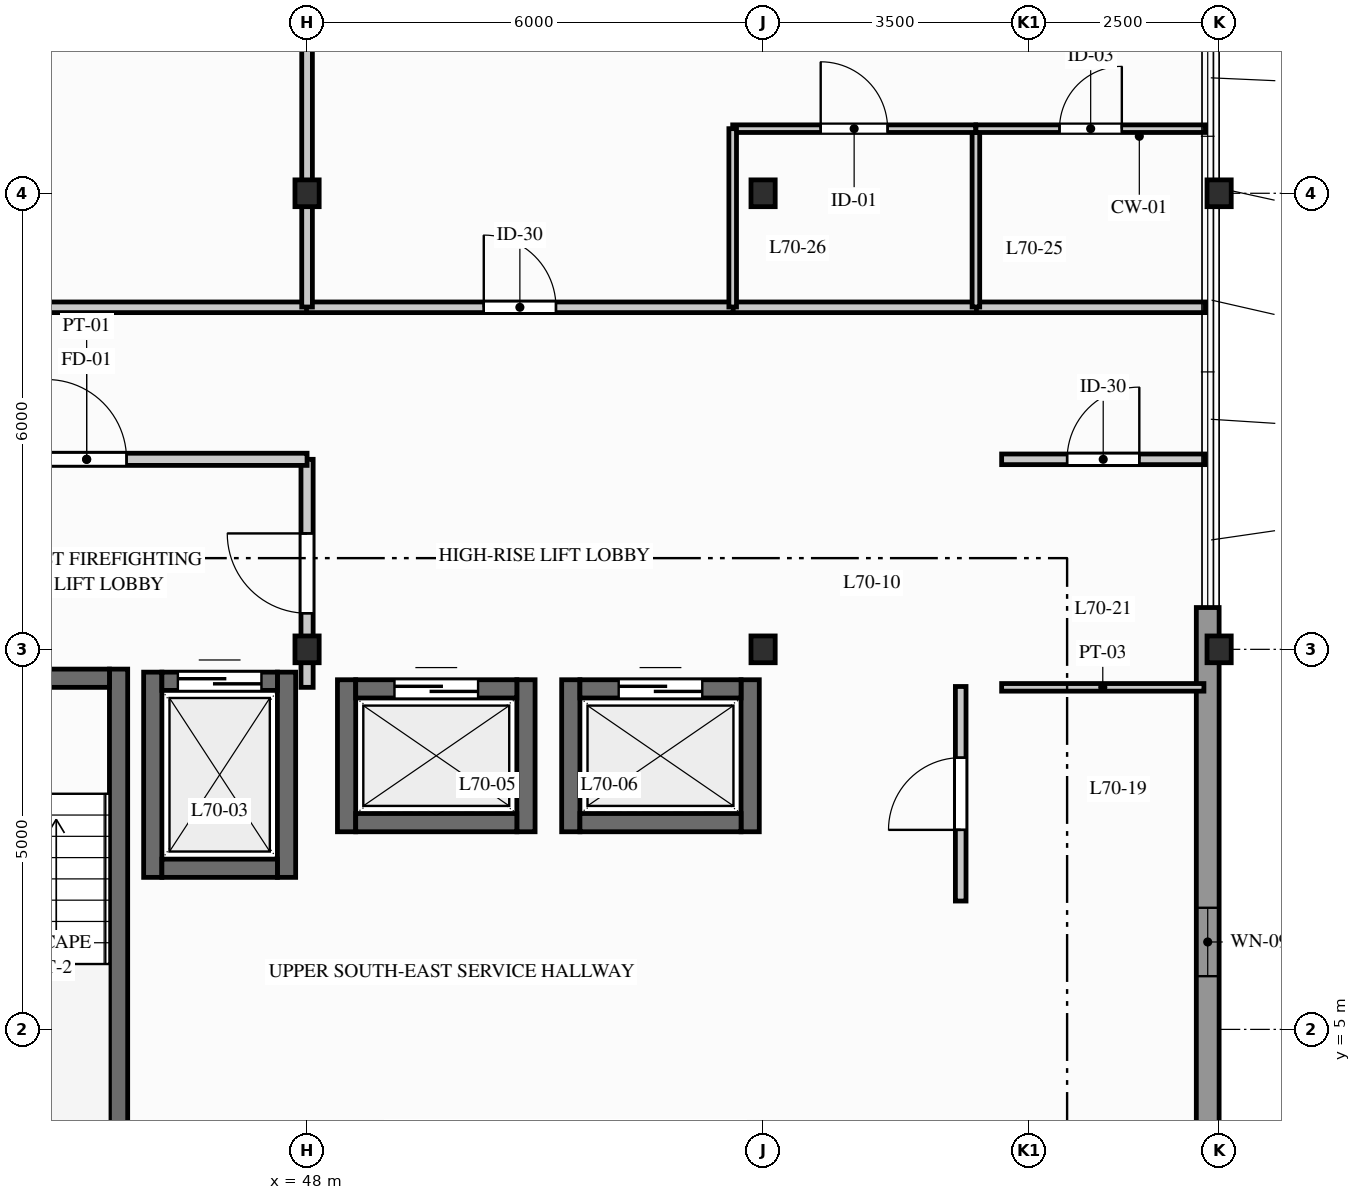
"""IFC4 building model, lengths in metres.
Left out: names, types, materials, properties, quantities, classifications, styles, units other than length and angle.
Written with IfcOpenShell. Run it as: python <this file> out.ifc"""

import sys

from ifc_helpers import new_model, si_unit, direction, frame, frame_2d, origin, origin_2d, place, context, subcontext, project, spatial, rectangle, i_section, extrude, element, fill, save


model = new_model("IFC4")
c1 = context("Model", 3, precision=1e-05, world=origin(), true_north=direction((0.0, 1.0)))
c2 = subcontext(c1, "Body", "Model", "MODEL_VIEW")
j1 = project(units=[si_unit("LENGTHUNIT", "METRE"), si_unit("PLANEANGLEUNIT", "RADIAN")], contexts=[c1])
p1 = place(None, origin())
s1 = spatial("IfcSite", under=j1, at=p1, CompositionType="ELEMENT")
p2 = place(p1, origin())
s2 = spatial("IfcBuilding", under=s1, at=p2, CompositionType="ELEMENT")
p3 = place(p2, frame((0.0, 0.0, 230.4)))
s3 = spatial("IfcBuildingStorey", under=s2, at=p3, CompositionType="ELEMENT", Elevation=230.4)
for number, where, z_axis, x_axis in (
    (1, (48.0, 10.0, 0.0), (0.0, 0.0, 1.0), (1.0, 0.0, 0.0)),
    (2, (48.0, 16.0, 0.0), (0.0, 0.0, 1.0), (1.0, 0.0, 0.0)),
    (3, (54.0, 10.0, 0.0), (0.0, 0.0, 1.0), (1.0, 0.0, 0.0)),
    (4, (54.0, 16.0, 0.0), (0.0, 0.0, 1.0), (1.0, 0.0, 0.0)),
    (5, (60.0, 10.0, 0.0), (0.0, 0.0, 1.0), (1.0, 0.0, 0.0)),
    (6, (60.0, 16.0, 0.0), (0.0, 0.0, 1.0), (1.0, 0.0, 0.0)),
):
    element("IfcColumn", number, at=place(p3, frame(where, z_axis=z_axis, x_axis=x_axis)), inside=s3, PredefinedType="COLUMN", context=c2, shape_type="SweptSolid", body=[
        extrude(i_section(OverallWidth=0.318, OverallDepth=0.353, WebThickness=0.023, FlangeThickness=0.038, FilletRadius=0.015, at=origin_2d()), origin(), (0.0, 0.0, 1.0), 3.1),
    ])
p4 = place(p3, frame((59.85, 2.5, 0.0), z_axis=(0.0, 0.0, 1.0), x_axis=(0.0, 1.0, 0.0)))
e7 = element("IfcWall", 7, at=p4, inside=s3, PredefinedType="STANDARD", context=c2, shape_type="SweptSolid", body=[
    extrude(rectangle(XDim=8.05, YDim=0.3, at=frame_2d((4.025, 0.0))), origin(), (0.0, 0.0, 1.0), 2.89),
])
p5 = place(p4, frame((3.2, 0.0, 1.2)))
e8 = element("IfcOpeningElement", 8, at=p5, cuts=e7, PredefinedType="OPENING", context=c2, shape_type="SweptSolid", body=[
    extrude(rectangle(XDim=0.9, YDim=0.9, at=frame_2d((0.45, 0.45))), frame((0.0, 0.16, 0.0), z_axis=(0.0, -1.0, 0.0), x_axis=(1.0, 0.0, 0.0)), (0.0, 0.0, 1.0), 0.32),
])
p6 = place(p3, frame((45.52, 2.54, 0.0), z_axis=(0.0, 0.0, 1.0), x_axis=(0.0, 1.0, 0.0)))
e9 = element("IfcWall", 9, at=p6, inside=s3, PredefinedType="SHEAR", context=c2, shape_type="SweptSolid", body=[
    extrude(rectangle(XDim=7.2, YDim=0.24, at=frame_2d((3.6, 0.0))), origin(), (0.0, 0.0, 1.0), 2.89),
])
p7 = place(p3, frame((45.4, 9.62, 0.0), z_axis=(0.0, 0.0, 1.0), x_axis=(-1.0, 0.0, 0.0)))
e10 = element("IfcWall", 10, at=p7, inside=s3, PredefinedType="SHEAR", context=c2, shape_type="SweptSolid", body=[
    extrude(rectangle(XDim=2.95, YDim=0.24, at=frame_2d((1.475, 0.0))), origin(), (0.0, 0.0, 1.0), 2.89),
])
p8 = place(p7, frame((0.95, 0.0, 0.0)))
e11 = element("IfcOpeningElement", 11, at=p8, cuts=e10, PredefinedType="OPENING", context=c2, shape_type="SweptSolid", body=[
    extrude(rectangle(XDim=1.05, YDim=2.06, at=frame_2d((0.525, 1.03))), frame((0.0, 0.13, 0.0), z_axis=(0.0, -1.0, 0.0), x_axis=(1.0, 0.0, 0.0)), (0.0, 0.0, 1.0), 0.26),
])
for number, where, z_axis, x_axis in (
    (12, (45.97, 7.0, 0.0), (0.0, 0.0, 1.0), (0.0, 1.0, 0.0)),
    (13, (47.73, 7.0, 0.0), (0.0, 0.0, 1.0), (0.0, 1.0, 0.0)),
):
    element("IfcWall", number, at=place(p3, frame(where, z_axis=z_axis, x_axis=x_axis)), inside=s3, PredefinedType="SHEAR", context=c2, shape_type="SweptSolid", body=[
        extrude(rectangle(XDim=2.7, YDim=0.24, at=frame_2d((1.35, 0.0))), origin(), (0.0, 0.0, 1.0), 2.89),
    ])
p9 = place(p3, frame((46.09, 7.12, 0.0), z_axis=(0.0, 0.0, 1.0), x_axis=(1.0, 0.0, 0.0)))
e14 = element("IfcWall", 14, at=p9, inside=s3, PredefinedType="SHEAR", context=c2, shape_type="SweptSolid", body=[
    extrude(rectangle(XDim=1.52, YDim=0.24, at=frame_2d((0.76, 0.0))), origin(), (0.0, 0.0, 1.0), 2.89),
])
p10 = place(p3, frame((46.09, 9.58, 0.0), z_axis=(0.0, 0.0, 1.0), x_axis=(1.0, 0.0, 0.0)))
e15 = element("IfcWall", 15, at=p10, inside=s3, PredefinedType="SHEAR", context=c2, shape_type="SweptSolid", body=[
    extrude(rectangle(XDim=1.52, YDim=0.24, at=frame_2d((0.76, 0.0))), origin(), (0.0, 0.0, 1.0), 2.89),
])
p11 = place(p10, frame((0.21, 0.0, 0.0)))
e16 = element("IfcOpeningElement", 16, at=p11, cuts=e15, PredefinedType="OPENING", context=c2, shape_type="SweptSolid", body=[
    extrude(rectangle(XDim=1.1, YDim=2.06, at=frame_2d((0.55, 1.03))), frame((0.0, 0.13, 0.0), z_axis=(0.0, -1.0, 0.0), x_axis=(1.0, 0.0, 0.0)), (0.0, 0.0, 1.0), 0.26),
])
for number, where, z_axis, x_axis in (
    (17, (48.52, 7.6, 0.0), (0.0, 0.0, 1.0), (0.0, 1.0, 0.0)),
    (18, (50.88, 7.6, 0.0), (0.0, 0.0, 1.0), (0.0, 1.0, 0.0)),
):
    element("IfcWall", number, at=place(p3, frame(where, z_axis=z_axis, x_axis=x_axis)), inside=s3, PredefinedType="SHEAR", context=c2, shape_type="SweptSolid", body=[
        extrude(rectangle(XDim=2.0, YDim=0.24, at=frame_2d((1.0, 0.0))), origin(), (0.0, 0.0, 1.0), 2.89),
    ])
p12 = place(p3, frame((48.64, 7.72, 0.0), z_axis=(0.0, 0.0, 1.0), x_axis=(1.0, 0.0, 0.0)))
e19 = element("IfcWall", 19, at=p12, inside=s3, PredefinedType="SHEAR", context=c2, shape_type="SweptSolid", body=[
    extrude(rectangle(XDim=2.12, YDim=0.24, at=frame_2d((1.06, 0.0))), origin(), (0.0, 0.0, 1.0), 2.89),
])
p13 = place(p3, frame((48.64, 9.48, 0.0), z_axis=(0.0, 0.0, 1.0), x_axis=(1.0, 0.0, 0.0)))
e20 = element("IfcWall", 20, at=p13, inside=s3, PredefinedType="SHEAR", context=c2, shape_type="SweptSolid", body=[
    extrude(rectangle(XDim=2.12, YDim=0.24, at=frame_2d((1.06, 0.0))), origin(), (0.0, 0.0, 1.0), 2.89),
])
p14 = place(p13, frame((0.51, 0.0, 0.0)))
e21 = element("IfcOpeningElement", 21, at=p14, cuts=e20, PredefinedType="OPENING", context=c2, shape_type="SweptSolid", body=[
    extrude(rectangle(XDim=1.1, YDim=2.06, at=frame_2d((0.55, 1.03))), frame((0.0, 0.13, 0.0), z_axis=(0.0, -1.0, 0.0), x_axis=(1.0, 0.0, 0.0)), (0.0, 0.0, 1.0), 0.26),
])
for number, where, z_axis, x_axis in (
    (22, (51.47, 7.6, 0.0), (0.0, 0.0, 1.0), (0.0, 1.0, 0.0)),
    (23, (53.83, 7.6, 0.0), (0.0, 0.0, 1.0), (0.0, 1.0, 0.0)),
):
    element("IfcWall", number, at=place(p3, frame(where, z_axis=z_axis, x_axis=x_axis)), inside=s3, PredefinedType="SHEAR", context=c2, shape_type="SweptSolid", body=[
        extrude(rectangle(XDim=2.0, YDim=0.24, at=frame_2d((1.0, 0.0))), origin(), (0.0, 0.0, 1.0), 2.89),
    ])
p15 = place(p3, frame((51.59, 7.72, 0.0), z_axis=(0.0, 0.0, 1.0), x_axis=(1.0, 0.0, 0.0)))
e24 = element("IfcWall", 24, at=p15, inside=s3, PredefinedType="SHEAR", context=c2, shape_type="SweptSolid", body=[
    extrude(rectangle(XDim=2.12, YDim=0.24, at=frame_2d((1.06, 0.0))), origin(), (0.0, 0.0, 1.0), 2.89),
])
p16 = place(p3, frame((51.59, 9.48, 0.0), z_axis=(0.0, 0.0, 1.0), x_axis=(1.0, 0.0, 0.0)))
e25 = element("IfcWall", 25, at=p16, inside=s3, PredefinedType="SHEAR", context=c2, shape_type="SweptSolid", body=[
    extrude(rectangle(XDim=2.12, YDim=0.24, at=frame_2d((1.06, 0.0))), origin(), (0.0, 0.0, 1.0), 2.89),
])
p17 = place(p16, frame((0.51, 0.0, 0.0)))
e26 = element("IfcOpeningElement", 26, at=p17, cuts=e25, PredefinedType="OPENING", context=c2, shape_type="SweptSolid", body=[
    extrude(rectangle(XDim=1.1, YDim=2.06, at=frame_2d((0.55, 1.03))), frame((0.0, 0.13, 0.0), z_axis=(0.0, -1.0, 0.0), x_axis=(1.0, 0.0, 0.0)), (0.0, 0.0, 1.0), 0.26),
])
p18 = place(p3, frame((56.6, 6.689, 0.0), z_axis=(0.0, 0.0, 1.0), x_axis=(0.0, 1.0, 0.0)))
e27 = element("IfcWall", 27, at=p18, inside=s3, PredefinedType="PARTITIONING", context=c2, shape_type="SweptSolid", body=[
    extrude(rectangle(XDim=2.823, YDim=0.14, at=frame_2d((1.411, 0.0))), origin(), (0.0, 0.0, 1.0), 2.89),
])
p19 = place(p18, frame((0.936, 0.0, 0.0)))
e28 = element("IfcOpeningElement", 28, at=p19, cuts=e27, PredefinedType="OPENING", context=c2, shape_type="SweptSolid", body=[
    extrude(rectangle(XDim=0.95, YDim=2.05, at=frame_2d((0.475, 1.025))), frame((0.0, 0.08, 0.0), z_axis=(0.0, -1.0, 0.0), x_axis=(1.0, 0.0, 0.0)), (0.0, 0.0, 1.0), 0.16),
])
p20 = place(p3, frame((48.0, 9.5, 0.0), z_axis=(0.0, 0.0, 1.0), x_axis=(0.0, 1.0, 0.0)))
e29 = element("IfcWall", 29, at=p20, inside=s3, PredefinedType="PARTITIONING", context=c2, shape_type="SweptSolid", body=[
    extrude(rectangle(XDim=3.0, YDim=0.16, at=frame_2d((1.5, 0.0))), origin(), (0.0, 0.0, 1.0), 2.326),
])
p21 = place(p20, frame((0.975, 0.0, 0.0)))
e30 = element("IfcOpeningElement", 30, at=p21, cuts=e29, PredefinedType="OPENING", context=c2, shape_type="SweptSolid", body=[
    extrude(rectangle(XDim=1.05, YDim=2.06, at=frame_2d((0.525, 1.03))), frame((0.0, 0.09, 0.0), z_axis=(0.0, -1.0, 0.0), x_axis=(1.0, 0.0, 0.0)), (0.0, 0.0, 1.0), 0.18),
])
p22 = place(p3, frame((42.2, 12.5, 0.0), z_axis=(0.0, 0.0, 1.0), x_axis=(1.0, 0.0, 0.0)))
e31 = element("IfcWall", 31, at=p22, inside=s3, PredefinedType="PARTITIONING", context=c2, shape_type="SweptSolid", body=[
    extrude(rectangle(XDim=5.8, YDim=0.16, at=frame_2d((2.9, 0.0))), origin(), (0.0, 0.0, 1.0), 2.326),
])
p23 = place(p22, frame((2.375, 0.0, 0.0)))
e32 = element("IfcOpeningElement", 32, at=p23, cuts=e31, PredefinedType="OPENING", context=c2, shape_type="SweptSolid", body=[
    extrude(rectangle(XDim=1.05, YDim=2.06, at=frame_2d((0.525, 1.03))), frame((0.0, 0.09, 0.0), z_axis=(0.0, -1.0, 0.0), x_axis=(1.0, 0.0, 0.0)), (0.0, 0.0, 1.0), 0.18),
])
p24 = place(p3, frame((57.139, 9.5, 0.0), z_axis=(0.0, 0.0, 1.0), x_axis=(1.0, 0.0, 0.0)))
e33 = element("IfcWall", 33, at=p24, inside=s3, PredefinedType="PARTITIONING", context=c2, shape_type="SweptSolid", body=[
    extrude(rectangle(XDim=2.661, YDim=0.1, at=frame_2d((1.331, 0.0))), origin(), (0.0, 0.0, 1.0), 2.89),
])
p25 = place(p3, frame((57.139, 12.5, 0.0), z_axis=(0.0, 0.0, 1.0), x_axis=(1.0, 0.0, 0.0)))
e34 = element("IfcWall", 34, at=p25, inside=s3, PredefinedType="PARTITIONING", context=c2, shape_type="SweptSolid", body=[
    extrude(rectangle(XDim=2.673, YDim=0.14, at=frame_2d((1.336, 0.0))), origin(), (0.0, 0.0, 1.0), 2.89),
])
p26 = place(p25, frame((0.861, 0.0, 0.0)))
e35 = element("IfcOpeningElement", 35, at=p26, cuts=e34, PredefinedType="OPENING", context=c2, shape_type="SweptSolid", body=[
    extrude(rectangle(XDim=0.95, YDim=2.05, at=frame_2d((0.475, 1.025))), frame((0.0, 0.08, 0.0), z_axis=(0.0, -1.0, 0.0), x_axis=(1.0, 0.0, 0.0)), (0.0, 0.0, 1.0), 0.16),
])
p27 = place(p3, frame((38.243, 14.5, 0.0), z_axis=(0.0, 0.0, 1.0), x_axis=(1.0, 0.0, 0.0)))
e36 = element("IfcWall", 36, at=p27, inside=s3, PredefinedType="PARTITIONING", context=c2, shape_type="SweptSolid", body=[
    extrude(rectangle(XDim=9.769, YDim=0.14, at=frame_2d((4.884, 0.0))), origin(), (0.0, 0.0, 1.0), 2.326),
])
p28 = place(p27, frame((4.409, 0.0, 0.0)))
e37 = element("IfcOpeningElement", 37, at=p28, cuts=e36, PredefinedType="OPENING", context=c2, shape_type="SweptSolid", body=[
    extrude(rectangle(XDim=0.95, YDim=2.05, at=frame_2d((0.475, 1.025))), frame((0.0, 0.08, 0.0), z_axis=(0.0, -1.0, 0.0), x_axis=(1.0, 0.0, 0.0)), (0.0, 0.0, 1.0), 0.16),
])
p29 = place(p3, frame((56.789, 14.5, 0.0), z_axis=(0.0, 0.0, 1.0), x_axis=(1.0, 0.0, 0.0)))
e38 = element("IfcWall", 38, at=p29, inside=s3, PredefinedType="PARTITIONING", context=c2, shape_type="SweptSolid", body=[
    extrude(rectangle(XDim=3.031, YDim=0.14, at=frame_2d((1.516, 0.0))), origin(), (0.0, 0.0, 1.0), 2.89),
])
p30 = place(p3, frame((53.589, 14.5, 0.0), z_axis=(0.0, 0.0, 1.0), x_axis=(1.0, 0.0, 0.0)))
e39 = element("IfcWall", 39, at=p30, inside=s3, PredefinedType="PARTITIONING", context=c2, shape_type="SweptSolid", body=[
    extrude(rectangle(XDim=3.219, YDim=0.14, at=frame_2d((1.609, 0.0))), origin(), (0.0, 0.0, 1.0), 2.326),
])
p31 = place(p3, frame((47.993, 14.5, 0.0), z_axis=(0.0, 0.0, 1.0), x_axis=(1.0, 0.0, 0.0)))
e40 = element("IfcWall", 40, at=p31, inside=s3, PredefinedType="PARTITIONING", context=c2, shape_type="SweptSolid", body=[
    extrude(rectangle(XDim=5.615, YDim=0.14, at=frame_2d((2.807, 0.0))), origin(), (0.0, 0.0, 1.0), 2.326),
])
p32 = place(p31, frame((2.332, 0.0, 0.0)))
e41 = element("IfcOpeningElement", 41, at=p32, cuts=e40, PredefinedType="OPENING", context=c2, shape_type="SweptSolid", body=[
    extrude(rectangle(XDim=0.95, YDim=2.05, at=frame_2d((0.475, 1.025))), frame((0.0, 0.08, 0.0), z_axis=(0.0, -1.0, 0.0), x_axis=(1.0, 0.0, 0.0)), (0.0, 0.0, 1.0), 0.16),
])
p33 = place(p3, frame((48.0, 14.504, 0.0), z_axis=(0.0, 0.0, 1.0), x_axis=(0.0, 1.0, 0.0)))
e42 = element("IfcWall", 42, at=p33, inside=s3, PredefinedType="PARTITIONING", context=c2, shape_type="SweptSolid", body=[
    extrude(rectangle(XDim=7.253, YDim=0.14, at=frame_2d((3.627, 0.0))), origin(), (0.0, 0.0, 1.0), 2.326),
])
p34 = place(p3, frame((56.8, 14.504, 0.0), z_axis=(0.0, 0.0, 1.0), x_axis=(0.0, 1.0, 0.0)))
e43 = element("IfcWall", 43, at=p34, inside=s3, PredefinedType="PARTITIONING", context=c2, shape_type="SweptSolid", body=[
    extrude(rectangle(XDim=2.346, YDim=0.1, at=frame_2d((1.173, 0.0))), origin(), (0.0, 0.0, 1.0), 2.326),
])
p35 = place(p3, frame((56.8, 16.85, 0.0), z_axis=(0.0, 0.0, 1.0), x_axis=(1.0, 0.0, 0.0)))
e44 = element("IfcWall", 44, at=p35, inside=s3, PredefinedType="PARTITIONING", context=c2, shape_type="SweptSolid", body=[
    extrude(rectangle(XDim=3.02, YDim=0.1, at=frame_2d((1.51, 0.0))), origin(), (0.0, 0.0, 1.0), 2.89),
])
p36 = place(p35, frame((1.1, 0.0, 0.0)))
e45 = element("IfcOpeningElement", 45, at=p36, cuts=e44, PredefinedType="OPENING", context=c2, shape_type="SweptSolid", body=[
    extrude(rectangle(XDim=0.82, YDim=2.02, at=frame_2d((0.41, 1.01))), frame((0.0, 0.06, 0.0), z_axis=(0.0, -1.0, 0.0), x_axis=(1.0, 0.0, 0.0)), (0.0, 0.0, 1.0), 0.12),
])
p37 = place(p3, frame((53.6, 16.85, 0.0), z_axis=(0.0, 0.0, 1.0), x_axis=(1.0, 0.0, 0.0)))
e46 = element("IfcWall", 46, at=p37, inside=s3, PredefinedType="PARTITIONING", context=c2, shape_type="SweptSolid", body=[
    extrude(rectangle(XDim=3.196, YDim=0.1, at=frame_2d((1.598, 0.0))), origin(), (0.0, 0.0, 1.0), 2.326),
])
p38 = place(p37, frame((1.158, 0.0, 0.0)))
e47 = element("IfcOpeningElement", 47, at=p38, cuts=e46, PredefinedType="OPENING", context=c2, shape_type="SweptSolid", body=[
    extrude(rectangle(XDim=0.88, YDim=2.04, at=frame_2d((0.44, 1.02))), frame((0.0, 0.06, 0.0), z_axis=(0.0, -1.0, 0.0), x_axis=(1.0, 0.0, 0.0)), (0.0, 0.0, 1.0), 0.12),
])
p39 = place(p3, frame((53.6, 14.504, 0.0), z_axis=(0.0, 0.0, 1.0), x_axis=(0.0, 1.0, 0.0)))
e48 = element("IfcWall", 48, at=p39, inside=s3, PredefinedType="PARTITIONING", context=c2, shape_type="SweptSolid", body=[
    extrude(rectangle(XDim=2.346, YDim=0.1, at=frame_2d((1.173, 0.0))), origin(), (0.0, 0.0, 1.0), 2.326),
])
p40 = place(p5, origin())
e49 = element("IfcWindow", 49, at=p40, inside=s3, PartitioningType="SINGLE_PANEL", PredefinedType="WINDOW", context=c2, shape_type="SweptSolid", body=[
    extrude(rectangle(XDim=0.9, YDim=0.9, at=frame_2d((0.45, 0.45))), frame((0.0, 0.03, 0.0), z_axis=(0.0, -1.0, 0.0), x_axis=(1.0, 0.0, 0.0)), (0.0, 0.0, 1.0), 0.06),
])
fill(e8, e49)
p41 = place(p11, origin())
e50 = element("IfcDoor", 50, at=p41, inside=s3, OperationType="SLIDING_TO_LEFT", PredefinedType="DOOR", context=c2, shape_type="SweptSolid", body=[
    extrude(rectangle(XDim=1.1, YDim=2.06, at=frame_2d((0.55, 1.03))), frame((0.0, 0.025, 0.0), z_axis=(0.0, -1.0, 0.0), x_axis=(1.0, 0.0, 0.0)), (0.0, 0.0, 1.0), 0.05),
])
fill(e16, e50)
p42 = place(p14, origin())
e51 = element("IfcDoor", 51, at=p42, inside=s3, OperationType="SLIDING_TO_LEFT", PredefinedType="DOOR", context=c2, shape_type="SweptSolid", body=[
    extrude(rectangle(XDim=1.1, YDim=2.06, at=frame_2d((0.55, 1.03))), frame((0.0, 0.025, 0.0), z_axis=(0.0, -1.0, 0.0), x_axis=(1.0, 0.0, 0.0)), (0.0, 0.0, 1.0), 0.05),
])
fill(e21, e51)
p43 = place(p17, origin())
e52 = element("IfcDoor", 52, at=p43, inside=s3, OperationType="SLIDING_TO_RIGHT", PredefinedType="DOOR", context=c2, shape_type="SweptSolid", body=[
    extrude(rectangle(XDim=1.1, YDim=2.06, at=frame_2d((0.55, 1.03))), frame((0.0, 0.025, 0.0), z_axis=(0.0, -1.0, 0.0), x_axis=(1.0, 0.0, 0.0)), (0.0, 0.0, 1.0), 0.05),
])
fill(e26, e52)
p44 = place(p19, origin())
e53 = element("IfcDoor", 53, at=p44, inside=s3, OperationType="SINGLE_SWING_LEFT", PredefinedType="DOOR", context=c2, shape_type="SweptSolid", body=[
    extrude(rectangle(XDim=0.95, YDim=2.05, at=frame_2d((0.475, 1.025))), frame((0.0, 0.025, 0.0), z_axis=(0.0, -1.0, 0.0), x_axis=(1.0, 0.0, 0.0)), (0.0, 0.0, 1.0), 0.05),
])
fill(e28, e53)
p45 = place(p21, origin())
e54 = element("IfcDoor", 54, at=p45, inside=s3, OperationType="SINGLE_SWING_RIGHT", PredefinedType="DOOR", context=c2, shape_type="SweptSolid", body=[
    extrude(rectangle(XDim=1.05, YDim=2.06, at=frame_2d((0.525, 1.03))), frame((0.0, 0.025, 0.0), z_axis=(0.0, -1.0, 0.0), x_axis=(1.0, 0.0, 0.0)), (0.0, 0.0, 1.0), 0.05),
])
fill(e30, e54)
p46 = place(p23, origin())
e55 = element("IfcDoor", 55, at=p46, inside=s3, OperationType="SINGLE_SWING_LEFT", PredefinedType="DOOR", context=c2, shape_type="SweptSolid", body=[
    extrude(rectangle(XDim=1.05, YDim=2.06, at=frame_2d((0.525, 1.03))), frame((0.0, 0.025, 0.0), z_axis=(0.0, -1.0, 0.0), x_axis=(1.0, 0.0, 0.0)), (0.0, 0.0, 1.0), 0.05),
])
fill(e32, e55)
p47 = place(p26, origin())
e56 = element("IfcDoor", 56, at=p47, inside=s3, OperationType="SINGLE_SWING_RIGHT", PredefinedType="DOOR", context=c2, shape_type="SweptSolid", body=[
    extrude(rectangle(XDim=0.95, YDim=2.05, at=frame_2d((0.475, 1.025))), frame((0.0, 0.025, 0.0), z_axis=(0.0, -1.0, 0.0), x_axis=(1.0, 0.0, 0.0)), (0.0, 0.0, 1.0), 0.05),
])
fill(e35, e56)
p48 = place(p32, origin())
e57 = element("IfcDoor", 57, at=p48, inside=s3, OperationType="SINGLE_SWING_LEFT", PredefinedType="DOOR", context=c2, shape_type="SweptSolid", body=[
    extrude(rectangle(XDim=0.95, YDim=2.05, at=frame_2d((0.475, 1.025))), frame((0.0, 0.025, 0.0), z_axis=(0.0, -1.0, 0.0), x_axis=(1.0, 0.0, 0.0)), (0.0, 0.0, 1.0), 0.05),
])
fill(e41, e57)
p49 = place(p36, origin())
e58 = element("IfcDoor", 58, at=p49, inside=s3, OperationType="SINGLE_SWING_RIGHT", PredefinedType="DOOR", context=c2, shape_type="SweptSolid", body=[
    extrude(rectangle(XDim=0.82, YDim=2.02, at=frame_2d((0.41, 1.01))), frame((0.0, 0.025, 0.0), z_axis=(0.0, -1.0, 0.0), x_axis=(1.0, 0.0, 0.0)), (0.0, 0.0, 1.0), 0.05),
])
fill(e45, e58)
p50 = place(p38, origin())
e59 = element("IfcDoor", 59, at=p50, inside=s3, OperationType="SINGLE_SWING_LEFT", PredefinedType="DOOR", context=c2, shape_type="SweptSolid", body=[
    extrude(rectangle(XDim=0.88, YDim=2.04, at=frame_2d((0.44, 1.02))), frame((0.0, 0.025, 0.0), z_axis=(0.0, -1.0, 0.0), x_axis=(1.0, 0.0, 0.0)), (0.0, 0.0, 1.0), 0.05),
])
fill(e47, e59)
save(model, sys.argv[1])
